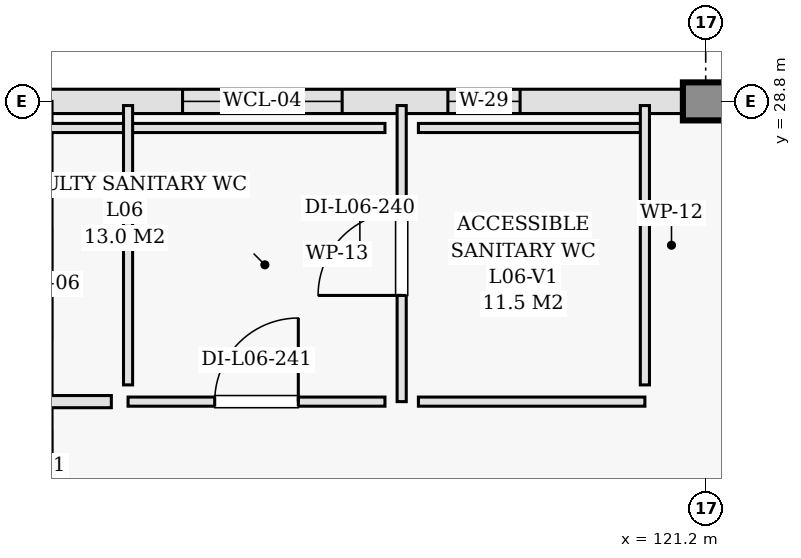
"""IFC4 building model, lengths in metres.
Left out: names, types, materials, properties, quantities, classifications, styles, units other than length and angle.
Written with IfcOpenShell. Run it as: python <this file> out.ifc"""

import sys

from ifc_helpers import new_model, si_unit, direction, frame, frame_2d, origin, origin_2d, place, context, subcontext, project, spatial, rectangle, extrude, element, fill, save


model = new_model("IFC4")
c1 = context("Model", 3, precision=1e-05, world=origin(), true_north=direction((0.0, 1.0)))
c2 = subcontext(c1, "Body", "Model", "MODEL_VIEW")
j1 = project(units=[si_unit("LENGTHUNIT", "METRE"), si_unit("PLANEANGLEUNIT", "RADIAN")], contexts=[c1])
p1 = place(None, origin())
s1 = spatial("IfcSite", under=j1, at=p1, CompositionType="ELEMENT")
p2 = place(p1, origin())
s2 = spatial("IfcBuilding", under=s1, at=p2, CompositionType="ELEMENT")
p3 = place(p2, frame((0.0, 0.0, 26.4)))
s3 = spatial("IfcBuildingStorey", under=s2, at=p3, CompositionType="ELEMENT", Elevation=26.4)
p4 = place(p3, frame((121.2, 28.8, 0.0), z_axis=(0.0, 0.0, 1.0), x_axis=(1.0, 0.0, 0.0)))
e1 = element("IfcColumn", 1, at=p4, inside=s3, PredefinedType="COLUMN", context=c2, shape_type="SweptSolid", body=[
    extrude(rectangle(XDim=0.5, YDim=0.5, at=origin_2d()), origin(), (0.0, 0.0, 1.0), 3.45),
])
p5 = place(p3, frame((130.2, 28.8, 0.0), z_axis=(0.0, 0.0, 1.0), x_axis=(-1.0, 0.0, 0.0)))
e2 = element("IfcWall", 2, at=p5, inside=s3, PredefinedType="SOLIDWALL", context=c2, shape_type="SweptSolid", body=[
    extrude(rectangle(XDim=9.0, YDim=0.3, at=frame_2d((4.5, 0.0))), origin(), (0.0, 0.0, 1.0), 2.555),
])
p6 = place(p5, frame((1.65, 0.0, 1.285)))
e3 = element("IfcOpeningElement", 3, at=p6, cuts=e2, PredefinedType="OPENING", context=c2, shape_type="SweptSolid", body=[
    extrude(rectangle(XDim=2.7, YDim=1.05, at=frame_2d((1.35, 0.525))), frame((0.0, 0.16, 0.0), z_axis=(0.0, -1.0, 0.0), x_axis=(1.0, 0.0, 0.0)), (0.0, 0.0, 1.0), 0.32),
])
p7 = place(p5, frame((4.65, 0.0, 1.285)))
e4 = element("IfcOpeningElement", 4, at=p7, cuts=e2, PredefinedType="OPENING", context=c2, shape_type="SweptSolid", body=[
    extrude(rectangle(XDim=2.7, YDim=1.05, at=frame_2d((1.35, 0.525))), frame((0.0, 0.16, 0.0), z_axis=(0.0, -1.0, 0.0), x_axis=(1.0, 0.0, 0.0)), (0.0, 0.0, 1.0), 0.32),
])
p8 = place(p3, frame((121.2, 28.8, 0.0), z_axis=(0.0, 0.0, 1.0), x_axis=(-1.0, 0.0, 0.0)))
e5 = element("IfcWall", 5, at=p8, inside=s3, PredefinedType="SOLIDWALL", context=c2, shape_type="SweptSolid", body=[
    extrude(rectangle(XDim=8.75, YDim=0.32, at=frame_2d((4.375, 0.0))), origin(), (0.0, 0.0, 1.0), 2.555),
])
p9 = place(p8, frame((2.442, 0.0, 1.385)))
e6 = element("IfcOpeningElement", 6, at=p9, cuts=e5, PredefinedType="OPENING", context=c2, shape_type="SweptSolid", body=[
    extrude(rectangle(XDim=0.95, YDim=0.95, at=frame_2d((0.475, 0.475))), frame((0.0, 0.17, 0.0), z_axis=(0.0, -1.0, 0.0), x_axis=(1.0, 0.0, 0.0)), (0.0, 0.0, 1.0), 0.34),
])
p10 = place(p8, frame((4.783, 0.0, 1.385)))
e7 = element("IfcOpeningElement", 7, at=p10, cuts=e5, PredefinedType="OPENING", context=c2, shape_type="SweptSolid", body=[
    extrude(rectangle(XDim=2.1, YDim=0.95, at=frame_2d((1.05, 0.475))), frame((0.0, 0.17, 0.0), z_axis=(0.0, -1.0, 0.0), x_axis=(1.0, 0.0, 0.0)), (0.0, 0.0, 1.0), 0.34),
])
p11 = place(p3, frame((117.2, 24.85, 0.0), z_axis=(0.0, 0.0, 1.0), x_axis=(0.0, 1.0, 0.0)))
e8 = element("IfcWall", 8, at=p11, inside=s3, PredefinedType="PARTITIONING", context=c2, shape_type="SweptSolid", body=[
    extrude(rectangle(XDim=3.895, YDim=0.12, at=frame_2d((1.948, 0.0))), origin(), (0.0, 0.0, 1.0), 3.22),
])
p12 = place(p11, frame((1.397, 0.0, 0.0)))
e9 = element("IfcOpeningElement", 9, at=p12, cuts=e8, PredefinedType="OPENING", context=c2, shape_type="SweptSolid", body=[
    extrude(rectangle(XDim=1.1, YDim=2.15, at=frame_2d((0.55, 1.075))), frame((0.0, 0.07, 0.0), z_axis=(0.0, -1.0, 0.0), x_axis=(1.0, 0.0, 0.0)), (0.0, 0.0, 1.0), 0.14),
])
for number, where, z_axis, x_axis in (
    (10, (117.42, 24.85, 0.0), (0.0, 0.0, 1.0), (1.0, 0.0, 0.0)),
    (11, (117.42, 28.45, 0.0), (0.0, 0.0, 1.0), (1.0, 0.0, 0.0)),
):
    element("IfcWall", number, at=place(p3, frame(where, z_axis=z_axis, x_axis=x_axis)), inside=s3, PredefinedType="PARTITIONING", context=c2, shape_type="SweptSolid", body=[
        extrude(rectangle(XDim=2.98, YDim=0.12, at=frame_2d((1.49, 0.0))), origin(), (0.0, 0.0, 1.0), 3.22),
    ])
p13 = place(p3, frame((120.4, 25.07, 0.0), z_axis=(0.0, 0.0, 1.0), x_axis=(0.0, 1.0, 0.0)))
e12 = element("IfcWall", 12, at=p13, inside=s3, PredefinedType="PARTITIONING", context=c2, shape_type="SweptSolid", body=[
    extrude(rectangle(XDim=3.675, YDim=0.12, at=frame_2d((1.837, 0.0))), origin(), (0.0, 0.0, 1.0), 3.22),
])
p14 = place(p3, frame((112.505, 28.45, 0.0), z_axis=(0.0, 0.0, 1.0), x_axis=(1.0, 0.0, 0.0)))
e13 = element("IfcWall", 13, at=p14, inside=s3, PredefinedType="PARTITIONING", context=c2, shape_type="SweptSolid", body=[
    extrude(rectangle(XDim=4.475, YDim=0.12, at=frame_2d((2.238, 0.0))), origin(), (0.0, 0.0, 1.0), 3.22),
])
p15 = place(p3, frame((113.6, 24.85, 0.0), z_axis=(0.0, 0.0, 1.0), x_axis=(1.0, 0.0, 0.0)))
e14 = element("IfcWall", 14, at=p15, inside=s3, PredefinedType="PARTITIONING", context=c2, shape_type="SweptSolid", body=[
    extrude(rectangle(XDim=3.38, YDim=0.12, at=frame_2d((1.69, 0.0))), origin(), (0.0, 0.0, 1.0), 3.22),
])
p16 = place(p15, frame((1.14, 0.0, 0.0)))
e15 = element("IfcOpeningElement", 15, at=p16, cuts=e14, PredefinedType="OPENING", context=c2, shape_type="SweptSolid", body=[
    extrude(rectangle(XDim=1.1, YDim=2.15, at=frame_2d((0.55, 1.075))), frame((0.0, 0.07, 0.0), z_axis=(0.0, -1.0, 0.0), x_axis=(1.0, 0.0, 0.0)), (0.0, 0.0, 1.0), 0.14),
])
p17 = place(p3, frame((113.6, 25.07, 0.0), z_axis=(0.0, 0.0, 1.0), x_axis=(0.0, 1.0, 0.0)))
e16 = element("IfcWall", 16, at=p17, inside=s3, PredefinedType="PARTITIONING", context=c2, shape_type="SweptSolid", body=[
    extrude(rectangle(XDim=3.675, YDim=0.12, at=frame_2d((1.837, 0.0))), origin(), (0.0, 0.0, 1.0), 3.22),
])
p18 = place(p3, frame((112.505, 24.85, 0.0), z_axis=(0.0, 0.0, 1.0), x_axis=(1.0, 0.0, 0.0)))
e17 = element("IfcWall", 17, at=p18, inside=s3, PredefinedType="PARTITIONING", context=c2, shape_type="SweptSolid", body=[
    extrude(rectangle(XDim=0.875, YDim=0.16, at=frame_2d((0.438, 0.0))), origin(), (0.0, 0.0, 1.0), 3.22),
])
p19 = place(p9, origin())
e18 = element("IfcWindow", 18, at=p19, inside=s3, PartitioningType="DOUBLE_PANEL_VERTICAL", PredefinedType="WINDOW", context=c2, shape_type="SweptSolid", body=[
    extrude(rectangle(XDim=0.95, YDim=0.95, at=frame_2d((0.475, 0.475))), frame((0.0, 0.03, 0.0), z_axis=(0.0, -1.0, 0.0), x_axis=(1.0, 0.0, 0.0)), (0.0, 0.0, 1.0), 0.06),
])
fill(e6, e18)
p20 = place(p10, origin())
e19 = element("IfcWindow", 19, at=p20, inside=s3, PartitioningType="DOUBLE_PANEL_VERTICAL", PredefinedType="WINDOW", context=c2, shape_type="SweptSolid", body=[
    extrude(rectangle(XDim=2.1, YDim=0.95, at=frame_2d((1.05, 0.475))), frame((0.0, 0.03, 0.0), z_axis=(0.0, -1.0, 0.0), x_axis=(1.0, 0.0, 0.0)), (0.0, 0.0, 1.0), 0.06),
])
fill(e7, e19)
p21 = place(p12, origin())
e20 = element("IfcDoor", 20, at=p21, inside=s3, OperationType="SINGLE_SWING_LEFT", PredefinedType="DOOR", context=c2, shape_type="SweptSolid", body=[
    extrude(rectangle(XDim=1.1, YDim=2.15, at=frame_2d((0.55, 1.075))), frame((0.0, 0.025, 0.0), z_axis=(0.0, -1.0, 0.0), x_axis=(1.0, 0.0, 0.0)), (0.0, 0.0, 1.0), 0.05),
])
fill(e9, e20)
p22 = place(p16, origin())
e21 = element("IfcDoor", 21, at=p22, inside=s3, OperationType="SINGLE_SWING_RIGHT", PredefinedType="DOOR", context=c2, shape_type="SweptSolid", body=[
    extrude(rectangle(XDim=1.1, YDim=2.15, at=frame_2d((0.55, 1.075))), frame((0.0, 0.025, 0.0), z_axis=(0.0, -1.0, 0.0), x_axis=(1.0, 0.0, 0.0)), (0.0, 0.0, 1.0), 0.05),
])
fill(e15, e21)
save(model, sys.argv[1])
